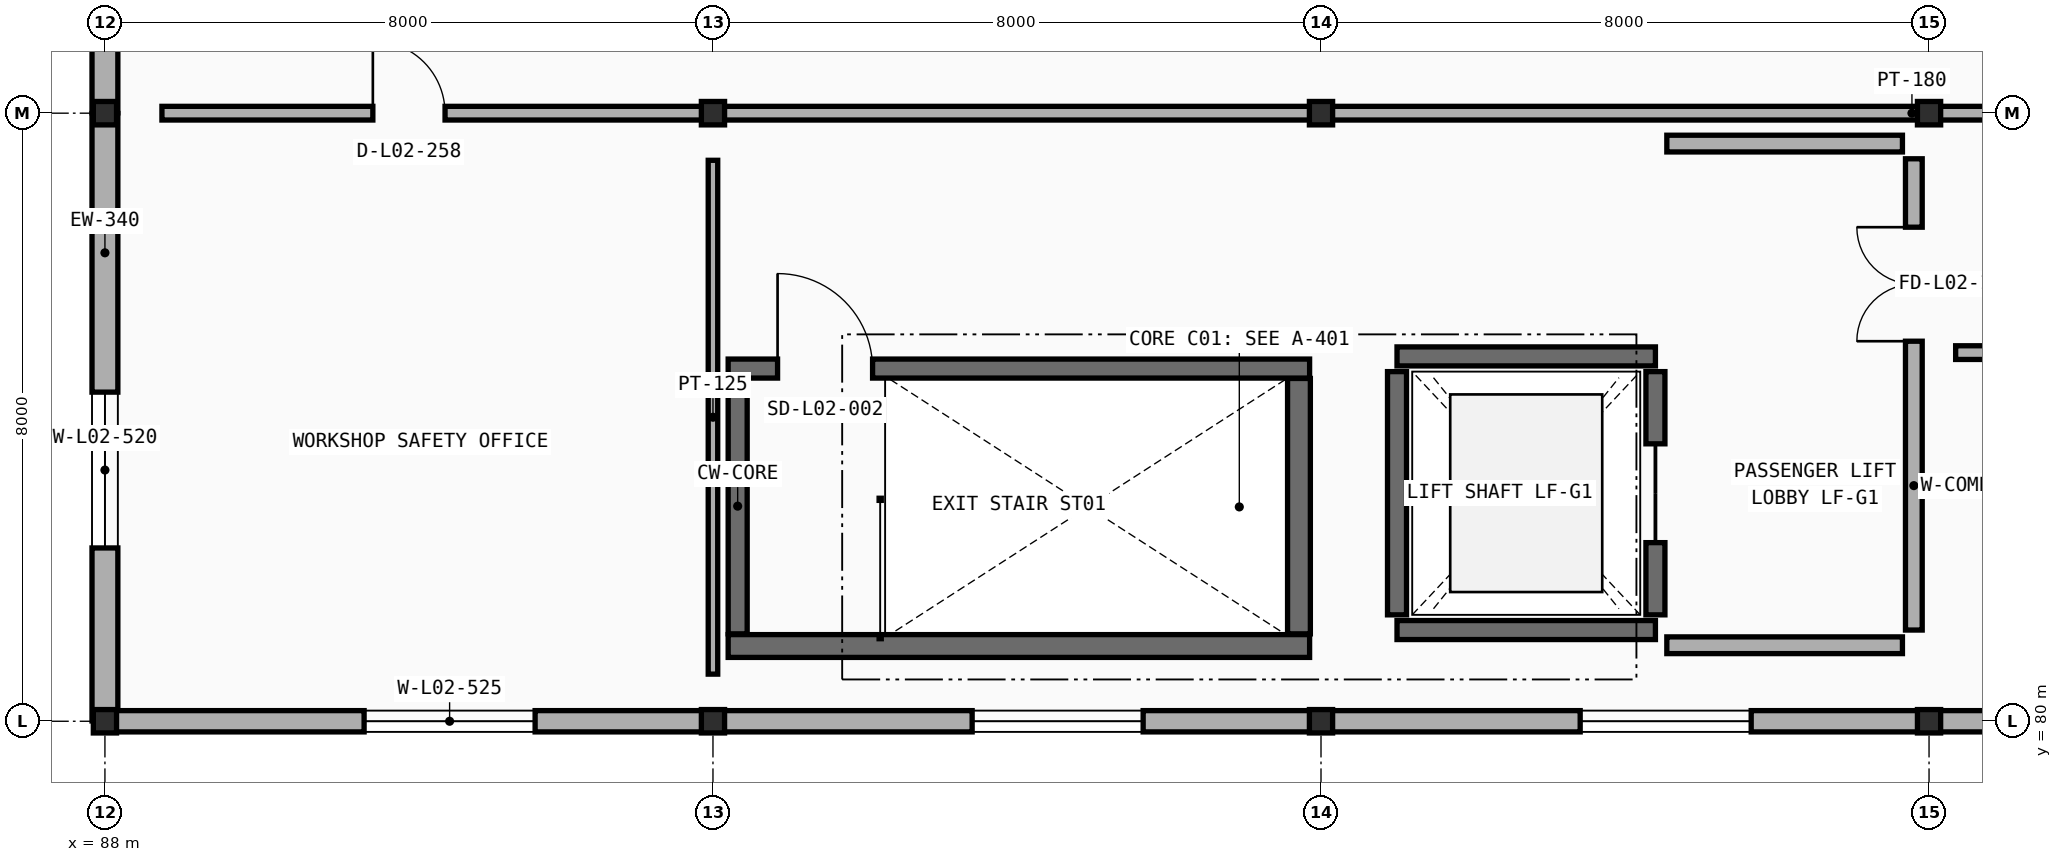
"""IFC4 building model, lengths in metres.
Left out: names, types, materials, properties, quantities, classifications, styles, units other than length and angle.
Written with IfcOpenShell. Run it as: python <this file> out.ifc"""

import sys

from ifc_helpers import new_model, si_unit, direction, frame, frame_2d, origin, origin_2d, place, context, subcontext, project, spatial, rectangle, i_section, extrude, element, fill, save


model = new_model("IFC4")
c1 = context("Model", 3, precision=1e-05, world=origin(), true_north=direction((0.0, 1.0)))
c2 = subcontext(c1, "Body", "Model", "MODEL_VIEW")
j1 = project(units=[si_unit("LENGTHUNIT", "METRE"), si_unit("PLANEANGLEUNIT", "RADIAN")], contexts=[c1])
p1 = place(None, origin())
s1 = spatial("IfcSite", under=j1, at=p1, CompositionType="ELEMENT")
p2 = place(p1, origin())
s2 = spatial("IfcBuilding", under=s1, at=p2, CompositionType="ELEMENT")
p3 = place(p2, frame((0.0, 0.0, 4.8)))
s3 = spatial("IfcBuildingStorey", under=s2, at=p3, CompositionType="ELEMENT", Elevation=4.8)
for number, where, z_axis, x_axis in (
    (1, (88.0, 80.0, 0.0), (0.0, 0.0, 1.0), (1.0, 0.0, 0.0)),
    (2, (96.0, 80.0, 0.0), (0.0, 0.0, 1.0), (1.0, 0.0, 0.0)),
    (3, (104.0, 80.0, 0.0), (0.0, 0.0, 1.0), (1.0, 0.0, 0.0)),
    (4, (112.0, 80.0, 0.0), (0.0, 0.0, 1.0), (1.0, 0.0, 0.0)),
    (5, (88.0, 88.0, 0.0), (0.0, 0.0, 1.0), (1.0, 0.0, 0.0)),
    (6, (96.0, 88.0, 0.0), (0.0, 0.0, 1.0), (1.0, 0.0, 0.0)),
    (7, (104.0, 88.0, 0.0), (0.0, 0.0, 1.0), (1.0, 0.0, 0.0)),
    (8, (112.0, 88.0, 0.0), (0.0, 0.0, 1.0), (1.0, 0.0, 0.0)),
):
    element("IfcColumn", number, at=place(p3, frame(where, z_axis=z_axis, x_axis=x_axis)), inside=s3, PredefinedType="COLUMN", context=c2, shape_type="SweptSolid", body=[
        extrude(i_section(OverallWidth=0.305, OverallDepth=0.308, WebThickness=0.01, FlangeThickness=0.015, FilletRadius=0.015, at=origin_2d()), origin(), (0.0, 0.0, 1.0), 5.15),
    ])
p4 = place(p3, frame((88.0, 80.004, 0.0), z_axis=(0.0, 0.0, 1.0), x_axis=(0.0, 1.0, 0.0)))
e9 = element("IfcWall", 9, at=p4, inside=s3, PredefinedType="STANDARD", context=c2, shape_type="SweptSolid", body=[
    extrude(rectangle(XDim=7.992, YDim=0.34, at=frame_2d((3.996, 0.0))), origin(), (0.0, 0.0, 1.0), 3.815),
])
p5 = place(p4, frame((2.276, 0.0, 1.2)))
e10 = element("IfcOpeningElement", 10, at=p5, cuts=e9, PredefinedType="OPENING", context=c2, shape_type="SweptSolid", body=[
    extrude(rectangle(XDim=2.05, YDim=2.0, at=frame_2d((1.025, 1.0))), frame((0.0, 0.18, 0.0), z_axis=(0.0, -1.0, 0.0), x_axis=(1.0, 0.0, 0.0)), (0.0, 0.0, 1.0), 0.36),
])
p6 = place(p3, frame((88.0, 88.004, 0.0), z_axis=(0.0, 0.0, 1.0), x_axis=(0.0, 1.0, 0.0)))
e11 = element("IfcWall", 11, at=p6, inside=s3, PredefinedType="STANDARD", context=c2, shape_type="SweptSolid", body=[
    extrude(rectangle(XDim=7.992, YDim=0.34, at=frame_2d((3.996, 0.0))), origin(), (0.0, 0.0, 1.0), 4.92),
])
p7 = place(p6, frame((2.276, 0.0, 1.2)))
e12 = element("IfcOpeningElement", 12, at=p7, cuts=e11, PredefinedType="OPENING", context=c2, shape_type="SweptSolid", body=[
    extrude(rectangle(XDim=2.05, YDim=2.0, at=frame_2d((1.025, 1.0))), frame((0.0, 0.18, 0.0), z_axis=(0.0, -1.0, 0.0), x_axis=(1.0, 0.0, 0.0)), (0.0, 0.0, 1.0), 0.36),
])
p8 = place(p3, frame((95.996, 80.0, 0.0), z_axis=(0.0, 0.0, 1.0), x_axis=(-1.0, 0.0, 0.0)))
e13 = element("IfcWall", 13, at=p8, inside=s3, PredefinedType="STANDARD", context=c2, shape_type="SweptSolid", body=[
    extrude(rectangle(XDim=7.992, YDim=0.28, at=frame_2d((3.996, 0.0))), origin(), (0.0, 0.0, 1.0), 3.965),
])
p9 = place(p8, frame((2.336, 0.0, 0.95)))
e14 = element("IfcOpeningElement", 14, at=p9, cuts=e13, PredefinedType="OPENING", context=c2, shape_type="SweptSolid", body=[
    extrude(rectangle(XDim=2.25, YDim=2.0, at=frame_2d((1.125, 1.0))), frame((0.0, 0.15, 0.0), z_axis=(0.0, -1.0, 0.0), x_axis=(1.0, 0.0, 0.0)), (0.0, 0.0, 1.0), 0.3),
])
p10 = place(p3, frame((103.996, 80.0, 0.0), z_axis=(0.0, 0.0, 1.0), x_axis=(-1.0, 0.0, 0.0)))
e15 = element("IfcWall", 15, at=p10, inside=s3, PredefinedType="STANDARD", context=c2, shape_type="SweptSolid", body=[
    extrude(rectangle(XDim=7.992, YDim=0.28, at=frame_2d((3.996, 0.0))), origin(), (0.0, 0.0, 1.0), 3.965),
])
p11 = place(p10, frame((2.336, 0.0, 0.95)))
e16 = element("IfcOpeningElement", 16, at=p11, cuts=e15, PredefinedType="OPENING", context=c2, shape_type="SweptSolid", body=[
    extrude(rectangle(XDim=2.25, YDim=2.0, at=frame_2d((1.125, 1.0))), frame((0.0, 0.15, 0.0), z_axis=(0.0, -1.0, 0.0), x_axis=(1.0, 0.0, 0.0)), (0.0, 0.0, 1.0), 0.3),
])
p12 = place(p3, frame((111.996, 80.0, 0.0), z_axis=(0.0, 0.0, 1.0), x_axis=(-1.0, 0.0, 0.0)))
e17 = element("IfcWall", 17, at=p12, inside=s3, PredefinedType="STANDARD", context=c2, shape_type="SweptSolid", body=[
    extrude(rectangle(XDim=7.992, YDim=0.28, at=frame_2d((3.996, 0.0))), origin(), (0.0, 0.0, 1.0), 3.965),
])
p13 = place(p12, frame((2.336, 0.0, 0.95)))
e18 = element("IfcOpeningElement", 18, at=p13, cuts=e17, PredefinedType="OPENING", context=c2, shape_type="SweptSolid", body=[
    extrude(rectangle(XDim=2.25, YDim=2.0, at=frame_2d((1.125, 1.0))), frame((0.0, 0.15, 0.0), z_axis=(0.0, -1.0, 0.0), x_axis=(1.0, 0.0, 0.0)), (0.0, 0.0, 1.0), 0.3),
])
p14 = place(p3, frame((119.996, 80.0, 0.0), z_axis=(0.0, 0.0, 1.0), x_axis=(-1.0, 0.0, 0.0)))
e19 = element("IfcWall", 19, at=p14, inside=s3, PredefinedType="STANDARD", context=c2, shape_type="SweptSolid", body=[
    extrude(rectangle(XDim=7.992, YDim=0.28, at=frame_2d((3.996, 0.0))), origin(), (0.0, 0.0, 1.0), 3.965),
])
p15 = place(p14, frame((2.336, 0.0, 0.95)))
e20 = element("IfcOpeningElement", 20, at=p15, cuts=e19, PredefinedType="OPENING", context=c2, shape_type="SweptSolid", body=[
    extrude(rectangle(XDim=2.25, YDim=2.0, at=frame_2d((1.125, 1.0))), frame((0.0, 0.15, 0.0), z_axis=(0.0, -1.0, 0.0), x_axis=(1.0, 0.0, 0.0)), (0.0, 0.0, 1.0), 0.3),
])
p16 = place(p3, frame((87.78, 87.9, 0.0), z_axis=(0.0, 0.0, 1.0), x_axis=(-1.0, 0.0, 0.0)))
e21 = element("IfcWall", 21, at=p16, inside=s3, PredefinedType="PARAPET", context=c2, shape_type="SweptSolid", body=[
    extrude(rectangle(XDim=39.56, YDim=0.2, at=frame_2d((19.78, 0.0))), origin(), (0.0, 0.0, 1.0), 1.15),
])
p17 = place(p3, frame((87.9, 72.22, 0.0), z_axis=(0.0, 0.0, 1.0), x_axis=(0.0, 1.0, 0.0)))
e22 = element("IfcWall", 22, at=p17, inside=s3, PredefinedType="PARAPET", context=c2, shape_type="SweptSolid", body=[
    extrude(rectangle(XDim=7.56, YDim=0.2, at=frame_2d((3.78, 0.0))), origin(), (0.0, 0.0, 1.0), 1.15),
])
p18 = place(p3, frame((96.2, 80.99, 0.0), z_axis=(0.0, 0.0, 1.0), x_axis=(1.0, 0.0, 0.0)))
e23 = element("IfcWall", 23, at=p18, inside=s3, PredefinedType="SHEAR", context=c2, shape_type="SweptSolid", body=[
    extrude(rectangle(XDim=7.65, YDim=0.3, at=frame_2d((3.825, 0.0))), origin(), (0.0, 0.0, 1.0), 4.8),
])
p19 = place(p3, frame((103.71, 81.15, 0.0), z_axis=(0.0, 0.0, 1.0), x_axis=(0.0, 1.0, 0.0)))
e24 = element("IfcWall", 24, at=p19, inside=s3, PredefinedType="SHEAR", context=c2, shape_type="SweptSolid", body=[
    extrude(rectangle(XDim=3.36, YDim=0.3, at=frame_2d((1.68, 0.0))), origin(), (0.0, 0.0, 1.0), 4.8),
])
p20 = place(p3, frame((96.2, 84.64, 0.0), z_axis=(0.0, 0.0, 1.0), x_axis=(1.0, 0.0, 0.0)))
e25 = element("IfcWall", 25, at=p20, inside=s3, PredefinedType="SOLIDWALL", context=c2, shape_type="SweptSolid", body=[
    extrude(rectangle(XDim=7.65, YDim=0.25, at=frame_2d((3.825, 0.0))), origin(), (0.0, 0.0, 1.0), 4.8),
])
p21 = place(p20, frame((0.65, 0.0, 0.0)))
e26 = element("IfcOpeningElement", 26, at=p21, cuts=e25, PredefinedType="OPENING", context=c2, shape_type="SweptSolid", body=[
    extrude(rectangle(XDim=1.25, YDim=2.15, at=frame_2d((0.625, 1.075))), frame((0.0, 0.135, 0.0), z_axis=(0.0, -1.0, 0.0), x_axis=(1.0, 0.0, 0.0)), (0.0, 0.0, 1.0), 0.27),
])
p22 = place(p3, frame((96.325, 81.15, 0.0), z_axis=(0.0, 0.0, 1.0), x_axis=(0.0, 1.0, 0.0)))
e27 = element("IfcWall", 27, at=p22, inside=s3, PredefinedType="SOLIDWALL", context=c2, shape_type="SweptSolid", body=[
    extrude(rectangle(XDim=3.36, YDim=0.25, at=frame_2d((1.68, 0.0))), origin(), (0.0, 0.0, 1.0), 4.8),
])
for number, where, z_axis, x_axis in (
    (28, (105.0, 81.2, 0.0), (0.0, 0.0, 1.0), (1.0, 0.0, 0.0)),
    (29, (105.0, 84.8, 0.0), (0.0, 0.0, 1.0), (1.0, 0.0, 0.0)),
):
    element("IfcWall", number, at=place(p3, frame(where, z_axis=z_axis, x_axis=x_axis)), inside=s3, PredefinedType="SOLIDWALL", context=c2, shape_type="SweptSolid", body=[
        extrude(rectangle(XDim=3.4, YDim=0.25, at=frame_2d((1.7, 0.0))), origin(), (0.0, 0.0, 1.0), 4.8),
    ])
p23 = place(p3, frame((105.0, 81.4, 0.0), z_axis=(0.0, 0.0, 1.0), x_axis=(0.0, 1.0, 0.0)))
e30 = element("IfcWall", 30, at=p23, inside=s3, PredefinedType="SOLIDWALL", context=c2, shape_type="SweptSolid", body=[
    extrude(rectangle(XDim=3.2, YDim=0.25, at=frame_2d((1.6, 0.0))), origin(), (0.0, 0.0, 1.0), 4.8),
])
p24 = place(p3, frame((108.4, 81.4, 0.0), z_axis=(0.0, 0.0, 1.0), x_axis=(0.0, 1.0, 0.0)))
e31 = element("IfcWall", 31, at=p24, inside=s3, PredefinedType="SOLIDWALL", context=c2, shape_type="SweptSolid", body=[
    extrude(rectangle(XDim=3.2, YDim=0.25, at=frame_2d((1.6, 0.0))), origin(), (0.0, 0.0, 1.0), 4.8),
])
p25 = place(p24, frame((0.95, 0.0, 0.0)))
e32 = element("IfcOpeningElement", 32, at=p25, cuts=e31, PredefinedType="OPENING", context=c2, shape_type="SweptSolid", body=[
    extrude(rectangle(XDim=1.3, YDim=2.2, at=frame_2d((0.65, 1.1))), frame((0.0, 0.135, 0.0), z_axis=(0.0, -1.0, 0.0), x_axis=(1.0, 0.0, 0.0)), (0.0, 0.0, 1.0), 0.27),
])
p26 = place(p3, frame((108.55, 81.0, 0.0), z_axis=(0.0, 0.0, 1.0), x_axis=(1.0, 0.0, 0.0)))
e33 = element("IfcWall", 33, at=p26, inside=s3, PredefinedType="PARTITIONING", context=c2, shape_type="SweptSolid", body=[
    extrude(rectangle(XDim=3.1, YDim=0.22, at=frame_2d((1.55, 0.0))), origin(), (0.0, 0.0, 1.0), 3.9),
])
p27 = place(p3, frame((108.55, 87.6, 0.0), z_axis=(0.0, 0.0, 1.0), x_axis=(1.0, 0.0, 0.0)))
e34 = element("IfcWall", 34, at=p27, inside=s3, PredefinedType="PARTITIONING", context=c2, shape_type="SweptSolid", body=[
    extrude(rectangle(XDim=3.1, YDim=0.22, at=frame_2d((1.55, 0.0))), origin(), (0.0, 0.0, 1.0), 3.887),
])
p28 = place(p3, frame((111.8, 81.2, 0.0), z_axis=(0.0, 0.0, 1.0), x_axis=(0.0, 1.0, 0.0)))
e35 = element("IfcWall", 35, at=p28, inside=s3, PredefinedType="PARTITIONING", context=c2, shape_type="SweptSolid", body=[
    extrude(rectangle(XDim=6.2, YDim=0.22, at=frame_2d((3.1, 0.0))), origin(), (0.0, 0.0, 1.0), 3.815),
])
p29 = place(p28, frame((3.8, 0.0, 0.0)))
e36 = element("IfcOpeningElement", 36, at=p29, cuts=e35, PredefinedType="OPENING", context=c2, shape_type="SweptSolid", body=[
    extrude(rectangle(XDim=1.5, YDim=2.2, at=frame_2d((0.75, 1.1))), frame((0.0, 0.12, 0.0), z_axis=(0.0, -1.0, 0.0), x_axis=(1.0, 0.0, 0.0)), (0.0, 0.0, 1.0), 0.24),
])
p30 = place(p3, frame((88.75, 88.0, 0.0), z_axis=(0.0, 0.0, 1.0), x_axis=(1.0, 0.0, 0.0)))
e37 = element("IfcWall", 37, at=p30, inside=s3, PredefinedType="PARTITIONING", context=c2, shape_type="SweptSolid", body=[
    extrude(rectangle(XDim=46.8, YDim=0.18, at=frame_2d((23.4, 0.0))), origin(), (0.0, 0.0, 1.0), 2.175),
])
p31 = place(p30, frame((2.775, 0.0, 0.0)))
e38 = element("IfcOpeningElement", 38, at=p31, cuts=e37, PredefinedType="OPENING", context=c2, shape_type="SweptSolid", body=[
    extrude(rectangle(XDim=0.95, YDim=2.1, at=frame_2d((0.475, 1.05))), frame((0.0, 0.1, 0.0), z_axis=(0.0, -1.0, 0.0), x_axis=(1.0, 0.0, 0.0)), (0.0, 0.0, 1.0), 0.2),
])
p32 = place(p30, frame((42.325, 0.0, 0.0)))
e39 = element("IfcOpeningElement", 39, at=p32, cuts=e37, PredefinedType="OPENING", context=c2, shape_type="SweptSolid", body=[
    extrude(rectangle(XDim=0.95, YDim=2.1, at=frame_2d((0.475, 1.05))), frame((0.0, 0.1, 0.0), z_axis=(0.0, -1.0, 0.0), x_axis=(1.0, 0.0, 0.0)), (0.0, 0.0, 1.0), 0.2),
])
p33 = place(p3, frame((96.0, 80.62, 0.0), z_axis=(0.0, 0.0, 1.0), x_axis=(0.0, 1.0, 0.0)))
e40 = element("IfcWall", 40, at=p33, inside=s3, PredefinedType="PARTITIONING", context=c2, shape_type="SweptSolid", body=[
    extrude(rectangle(XDim=6.76, YDim=0.125, at=frame_2d((3.38, 0.0))), origin(), (0.0, 0.0, 1.0), 3.815),
])
p34 = place(p3, frame((112.35, 84.85, 0.0), z_axis=(0.0, 0.0, 1.0), x_axis=(1.0, 0.0, 0.0)))
e41 = element("IfcWall", 41, at=p34, inside=s3, PredefinedType="PARTITIONING", context=c2, shape_type="SweptSolid", body=[
    extrude(rectangle(XDim=31.3, YDim=0.18, at=frame_2d((15.65, 0.0))), origin(), (0.0, 0.0, 1.0), 3.9),
])
p35 = place(p34, frame((2.88, 0.0, 0.0)))
e42 = element("IfcOpeningElement", 42, at=p35, cuts=e41, PredefinedType="OPENING", context=c2, shape_type="SweptSolid", body=[
    extrude(rectangle(XDim=1.54, YDim=2.2, at=frame_2d((0.77, 1.1))), frame((0.0, 0.1, 0.0), z_axis=(0.0, -1.0, 0.0), x_axis=(1.0, 0.0, 0.0)), (0.0, 0.0, 1.0), 0.2),
])
p36 = place(p5, origin())
e43 = element("IfcWindow", 43, at=p36, inside=s3, PartitioningType="DOUBLE_PANEL_VERTICAL", PredefinedType="WINDOW", context=c2, shape_type="SweptSolid", body=[
    extrude(rectangle(XDim=2.05, YDim=2.0, at=frame_2d((1.025, 1.0))), frame((0.0, 0.03, 0.0), z_axis=(0.0, -1.0, 0.0), x_axis=(1.0, 0.0, 0.0)), (0.0, 0.0, 1.0), 0.06),
])
fill(e10, e43)
p37 = place(p9, origin())
e44 = element("IfcWindow", 44, at=p37, inside=s3, PartitioningType="DOUBLE_PANEL_VERTICAL", PredefinedType="WINDOW", context=c2, shape_type="SweptSolid", body=[
    extrude(rectangle(XDim=2.25, YDim=2.0, at=frame_2d((1.125, 1.0))), frame((0.0, 0.03, 0.0), z_axis=(0.0, -1.0, 0.0), x_axis=(1.0, 0.0, 0.0)), (0.0, 0.0, 1.0), 0.06),
])
fill(e14, e44)
p38 = place(p11, origin())
e45 = element("IfcWindow", 45, at=p38, inside=s3, PartitioningType="DOUBLE_PANEL_VERTICAL", PredefinedType="WINDOW", context=c2, shape_type="SweptSolid", body=[
    extrude(rectangle(XDim=2.25, YDim=2.0, at=frame_2d((1.125, 1.0))), frame((0.0, 0.03, 0.0), z_axis=(0.0, -1.0, 0.0), x_axis=(1.0, 0.0, 0.0)), (0.0, 0.0, 1.0), 0.06),
])
fill(e16, e45)
p39 = place(p13, origin())
e46 = element("IfcWindow", 46, at=p39, inside=s3, PartitioningType="DOUBLE_PANEL_VERTICAL", PredefinedType="WINDOW", context=c2, shape_type="SweptSolid", body=[
    extrude(rectangle(XDim=2.25, YDim=2.0, at=frame_2d((1.125, 1.0))), frame((0.0, 0.03, 0.0), z_axis=(0.0, -1.0, 0.0), x_axis=(1.0, 0.0, 0.0)), (0.0, 0.0, 1.0), 0.06),
])
fill(e18, e46)
p40 = place(p21, origin())
e47 = element("IfcDoor", 47, at=p40, inside=s3, OperationType="SINGLE_SWING_LEFT", PredefinedType="DOOR", context=c2, shape_type="SweptSolid", body=[
    extrude(rectangle(XDim=1.25, YDim=2.15, at=frame_2d((0.625, 1.075))), frame((0.0, 0.025, 0.0), z_axis=(0.0, -1.0, 0.0), x_axis=(1.0, 0.0, 0.0)), (0.0, 0.0, 1.0), 0.05),
])
fill(e26, e47)
p41 = place(p25, origin())
e48 = element("IfcDoor", 48, at=p41, inside=s3, OperationType="DOUBLE_DOOR_SLIDING", PredefinedType="DOOR", context=c2, shape_type="SweptSolid", body=[
    extrude(rectangle(XDim=1.3, YDim=2.2, at=frame_2d((0.65, 1.1))), frame((0.0, 0.025, 0.0), z_axis=(0.0, -1.0, 0.0), x_axis=(1.0, 0.0, 0.0)), (0.0, 0.0, 1.0), 0.05),
])
fill(e32, e48)
p42 = place(p29, origin())
e49 = element("IfcDoor", 49, at=p42, inside=s3, OperationType="DOUBLE_DOOR_SINGLE_SWING", PredefinedType="DOOR", context=c2, shape_type="SweptSolid", body=[
    extrude(rectangle(XDim=1.5, YDim=2.2, at=frame_2d((0.75, 1.1))), frame((0.0, 0.025, 0.0), z_axis=(0.0, -1.0, 0.0), x_axis=(1.0, 0.0, 0.0)), (0.0, 0.0, 1.0), 0.05),
])
fill(e36, e49)
p43 = place(p31, origin())
e50 = element("IfcDoor", 50, at=p43, inside=s3, OperationType="SINGLE_SWING_LEFT", PredefinedType="DOOR", context=c2, shape_type="SweptSolid", body=[
    extrude(rectangle(XDim=0.95, YDim=2.1, at=frame_2d((0.475, 1.05))), frame((0.0, 0.025, 0.0), z_axis=(0.0, -1.0, 0.0), x_axis=(1.0, 0.0, 0.0)), (0.0, 0.0, 1.0), 0.05),
])
fill(e38, e50)
save(model, sys.argv[1])
